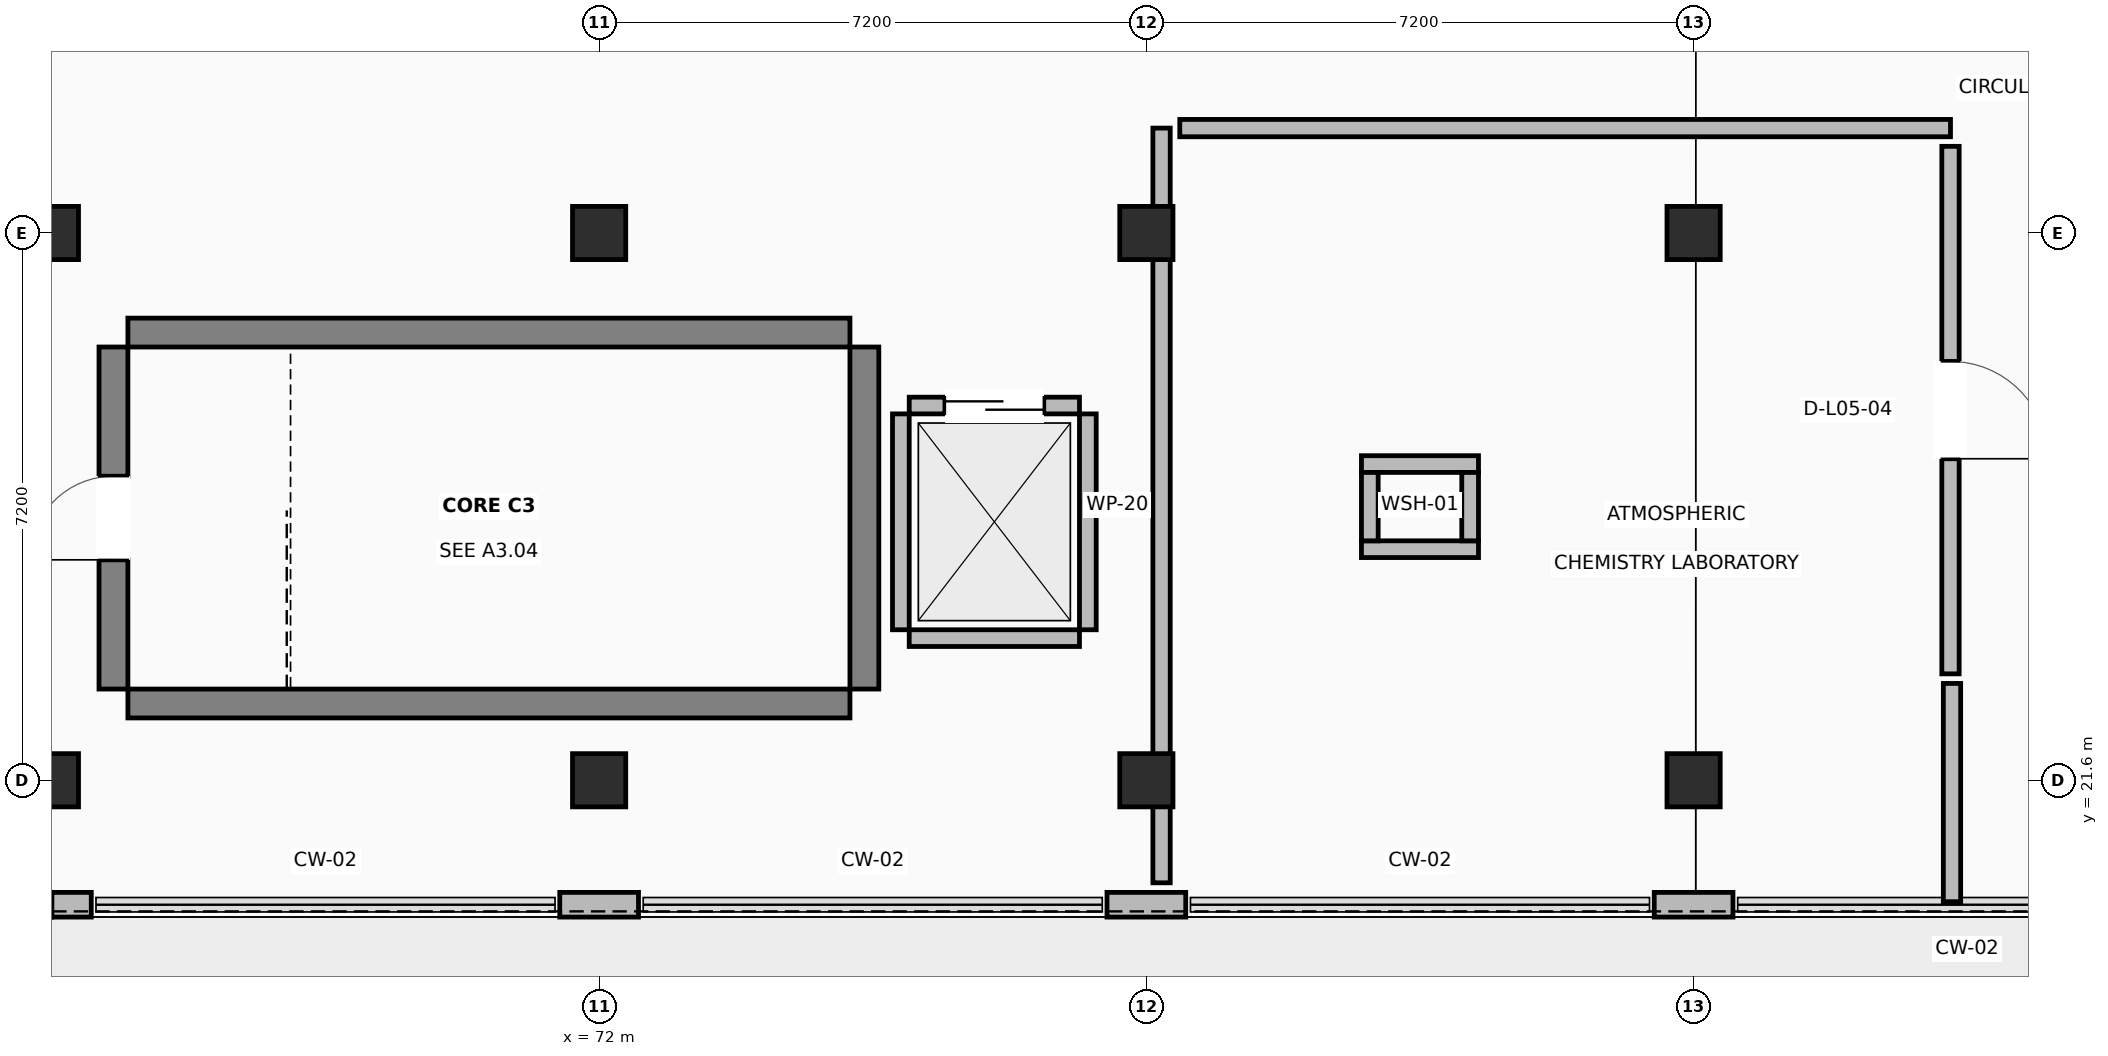
"""IFC4 building model, lengths in metres.
Left out: names, types, materials, properties, quantities, classifications, styles, units other than length and angle.
Written with IfcOpenShell. Run it as: python <this file> out.ifc"""

import sys

from ifc_helpers import new_model, si_unit, direction, frame, frame_2d, origin, origin_2d, place, context, subcontext, project, spatial, rectangle, extrude, element, fill, save


model = new_model("IFC4")
c1 = context("Model", 3, precision=1e-05, world=origin(), true_north=direction((0.0, 1.0)))
c2 = subcontext(c1, "Body", "Model", "MODEL_VIEW")
j1 = project(units=[si_unit("LENGTHUNIT", "METRE"), si_unit("PLANEANGLEUNIT", "RADIAN")], contexts=[c1])
p1 = place(None, origin())
s1 = spatial("IfcSite", under=j1, at=p1, CompositionType="ELEMENT")
p2 = place(p1, origin())
s2 = spatial("IfcBuilding", under=s1, at=p2, CompositionType="ELEMENT")
p3 = place(p2, frame((0.0, 0.0, 22.5)))
s3 = spatial("IfcBuildingStorey", under=s2, at=p3, CompositionType="ELEMENT", Elevation=22.5)
for number, where, z_axis, x_axis in (
    (1, (64.8, 21.6, 0.0), (0.0, 0.0, 1.0), (1.0, 0.0, 0.0)),
    (2, (64.8, 28.8, 0.0), (0.0, 0.0, 1.0), (1.0, 0.0, 0.0)),
    (3, (72.0, 21.6, 0.0), (0.0, 0.0, 1.0), (1.0, 0.0, 0.0)),
    (4, (72.0, 28.8, 0.0), (0.0, 0.0, 1.0), (1.0, 0.0, 0.0)),
    (5, (79.2, 21.6, 0.0), (0.0, 0.0, 1.0), (1.0, 0.0, 0.0)),
    (6, (79.2, 28.8, 0.0), (0.0, 0.0, 1.0), (1.0, 0.0, 0.0)),
    (7, (86.4, 21.6, 0.0), (0.0, 0.0, 1.0), (1.0, 0.0, 0.0)),
    (8, (86.4, 28.8, 0.0), (0.0, 0.0, 1.0), (1.0, 0.0, 0.0)),
):
    element("IfcColumn", number, at=place(p3, frame(where, z_axis=z_axis, x_axis=x_axis)), inside=s3, PredefinedType="COLUMN", context=c2, shape_type="SweptSolid", body=[
        extrude(rectangle(XDim=0.7, YDim=0.7, at=origin_2d()), origin(), (0.0, 0.0, 1.0), 4.5),
    ])
for number, where, z_axis, x_axis in (
    (9, (65.8, 22.61, 0.0), (0.0, 0.0, 1.0), (1.0, 0.0, 0.0)),
    (10, (65.8, 27.49, 0.0), (0.0, 0.0, 1.0), (1.0, 0.0, 0.0)),
):
    element("IfcWall", number, at=place(p3, frame(where, z_axis=z_axis, x_axis=x_axis)), inside=s3, PredefinedType="SHEAR", context=c2, shape_type="SweptSolid", body=[
        extrude(rectangle(XDim=9.5, YDim=0.38, at=frame_2d((4.75, 0.0))), origin(), (0.0, 0.0, 1.0), 4.22),
    ])
p4 = place(p3, frame((65.61, 22.8, 0.0), z_axis=(0.0, 0.0, 1.0), x_axis=(0.0, 1.0, 0.0)))
e11 = element("IfcWall", 11, at=p4, inside=s3, PredefinedType="SHEAR", context=c2, shape_type="SweptSolid", body=[
    extrude(rectangle(XDim=4.5, YDim=0.38, at=frame_2d((2.25, 0.0))), origin(), (0.0, 0.0, 1.0), 4.22),
])
p5 = place(p4, frame((1.7, 0.0, 0.0)))
e12 = element("IfcOpeningElement", 12, at=p5, cuts=e11, PredefinedType="OPENING", context=c2, shape_type="SweptSolid", body=[
    extrude(rectangle(XDim=1.1, YDim=2.15, at=frame_2d((0.55, 1.075))), frame((0.0, 0.2, 0.0), z_axis=(0.0, -1.0, 0.0), x_axis=(1.0, 0.0, 0.0)), (0.0, 0.0, 1.0), 0.4),
])
p6 = place(p3, frame((75.49, 22.8, 0.0), z_axis=(0.0, 0.0, 1.0), x_axis=(0.0, 1.0, 0.0)))
e13 = element("IfcWall", 13, at=p6, inside=s3, PredefinedType="SHEAR", context=c2, shape_type="SweptSolid", body=[
    extrude(rectangle(XDim=4.5, YDim=0.38, at=frame_2d((2.25, 0.0))), origin(), (0.0, 0.0, 1.0), 4.22),
])
p7 = place(p3, frame((64.8, 19.962, 0.0), z_axis=(0.0, 0.0, 1.0), x_axis=(1.0, 0.0, 0.0)))
e14 = element("IfcWall", 14, at=p7, inside=s3, PredefinedType="STANDARD", context=c2, shape_type="SweptSolid", body=[
    extrude(rectangle(XDim=0.518, YDim=0.325, at=frame_2d((0.259, 0.0))), origin(), (0.0, 0.0, 1.0), 3.26),
])
for number, where, z_axis, x_axis in (
    (15, (71.482, 19.962, 0.0), (0.0, 0.0, 1.0), (1.0, 0.0, 0.0)),
    (16, (78.682, 19.962, 0.0), (0.0, 0.0, 1.0), (1.0, 0.0, 0.0)),
):
    element("IfcWall", number, at=place(p3, frame(where, z_axis=z_axis, x_axis=x_axis)), inside=s3, PredefinedType="STANDARD", context=c2, shape_type="SweptSolid", body=[
        extrude(rectangle(XDim=1.036, YDim=0.325, at=frame_2d((0.518, 0.0))), origin(), (0.0, 0.0, 1.0), 3.26),
    ])
p8 = place(p3, frame((85.882, 19.962, 0.0), z_axis=(0.0, 0.0, 1.0), x_axis=(1.0, 0.0, 0.0)))
e17 = element("IfcWall", 17, at=p8, inside=s3, PredefinedType="STANDARD", context=c2, shape_type="SweptSolid", body=[
    extrude(rectangle(XDim=1.036, YDim=0.325, at=frame_2d((0.518, 0.0))), origin(), (0.0, 0.0, 1.0), 3.26),
])
p9 = place(p3, frame((76.08, 23.47, 0.0), z_axis=(0.0, 0.0, 1.0), x_axis=(1.0, 0.0, 0.0)))
e18 = element("IfcWall", 18, at=p9, inside=s3, PredefinedType="STANDARD", context=c2, shape_type="SweptSolid", body=[
    extrude(rectangle(XDim=2.24, YDim=0.22, at=frame_2d((1.12, 0.0))), origin(), (0.0, 0.0, 1.0), 3.26),
])
p10 = place(p3, frame((76.08, 26.53, 0.0), z_axis=(0.0, 0.0, 1.0), x_axis=(1.0, 0.0, 0.0)))
e19 = element("IfcWall", 19, at=p10, inside=s3, PredefinedType="STANDARD", context=c2, shape_type="SweptSolid", body=[
    extrude(rectangle(XDim=2.24, YDim=0.22, at=frame_2d((1.12, 0.0))), origin(), (0.0, 0.0, 1.0), 3.26),
])
p11 = place(p10, frame((0.47, 0.0, 0.0)))
e20 = element("IfcOpeningElement", 20, at=p11, cuts=e19, PredefinedType="OPENING", context=c2, shape_type="SweptSolid", body=[
    extrude(rectangle(XDim=1.3, YDim=2.2, at=frame_2d((0.65, 1.1))), frame((0.0, 0.12, 0.0), z_axis=(0.0, -1.0, 0.0), x_axis=(1.0, 0.0, 0.0)), (0.0, 0.0, 1.0), 0.24),
])
for number, where, z_axis, x_axis in (
    (21, (75.97, 23.58, 0.0), (0.0, 0.0, 1.0), (0.0, 1.0, 0.0)),
    (22, (78.43, 23.58, 0.0), (0.0, 0.0, 1.0), (0.0, 1.0, 0.0)),
):
    element("IfcWall", number, at=place(p3, frame(where, z_axis=z_axis, x_axis=x_axis)), inside=s3, PredefinedType="STANDARD", context=c2, shape_type="SweptSolid", body=[
        extrude(rectangle(XDim=2.84, YDim=0.22, at=frame_2d((1.42, 0.0))), origin(), (0.0, 0.0, 1.0), 3.26),
    ])
for number, where, z_axis, x_axis in (
    (23, (82.03, 24.64, 0.0), (0.0, 0.0, 1.0), (1.0, 0.0, 0.0)),
    (24, (82.03, 25.76, 0.0), (0.0, 0.0, 1.0), (1.0, 0.0, 0.0)),
):
    element("IfcWall", number, at=place(p3, frame(where, z_axis=z_axis, x_axis=x_axis)), inside=s3, PredefinedType="STANDARD", context=c2, shape_type="SweptSolid", body=[
        extrude(rectangle(XDim=1.54, YDim=0.22, at=frame_2d((0.77, 0.0))), origin(), (0.0, 0.0, 1.0), 3.26),
    ])
for number, where, z_axis, x_axis in (
    (25, (82.14, 24.75, 0.0), (0.0, 0.0, 1.0), (0.0, 1.0, 0.0)),
    (26, (83.46, 24.75, 0.0), (0.0, 0.0, 1.0), (0.0, 1.0, 0.0)),
):
    element("IfcWall", number, at=place(p3, frame(where, z_axis=z_axis, x_axis=x_axis)), inside=s3, PredefinedType="STANDARD", context=c2, shape_type="SweptSolid", body=[
        extrude(rectangle(XDim=0.9, YDim=0.22, at=frame_2d((0.45, 0.0))), origin(), (0.0, 0.0, 1.0), 3.26),
    ])
p12 = place(p3, frame((79.4, 20.251, 0.0), z_axis=(0.0, 0.0, 1.0), x_axis=(0.0, 1.0, 0.0)))
e27 = element("IfcWall", 27, at=p12, inside=s3, PredefinedType="PARTITIONING", context=c2, shape_type="SweptSolid", body=[
    extrude(rectangle(XDim=9.929, YDim=0.228, at=frame_2d((4.964, 0.0))), origin(), (0.0, 0.0, 1.0), 3.26),
])
p13 = place(p3, frame((79.64, 30.18, 0.0), z_axis=(0.0, 0.0, 1.0), x_axis=(1.0, 0.0, 0.0)))
e28 = element("IfcWall", 28, at=p13, inside=s3, PredefinedType="PARTITIONING", context=c2, shape_type="SweptSolid", body=[
    extrude(rectangle(XDim=10.14, YDim=0.228, at=frame_2d((5.07, 0.0))), origin(), (0.0, 0.0, 1.0), 3.26),
])
p14 = place(p3, frame((89.78, 29.94, 0.0), z_axis=(0.0, 0.0, 1.0), x_axis=(0.0, -1.0, 0.0)))
e29 = element("IfcWall", 29, at=p14, inside=s3, PredefinedType="PARTITIONING", context=c2, shape_type="SweptSolid", body=[
    extrude(rectangle(XDim=6.94, YDim=0.228, at=frame_2d((3.47, 0.0))), origin(), (0.0, 0.0, 1.0), 3.26),
])
p15 = place(p14, frame((2.83, 0.0, 0.0)))
e30 = element("IfcOpeningElement", 30, at=p15, cuts=e29, PredefinedType="OPENING", context=c2, shape_type="SweptSolid", body=[
    extrude(rectangle(XDim=1.28, YDim=2.15, at=frame_2d((0.64, 1.075))), frame((0.0, 0.124, 0.0), z_axis=(0.0, -1.0, 0.0), x_axis=(1.0, 0.0, 0.0)), (0.0, 0.0, 1.0), 0.248),
])
p16 = place(p3, frame((89.8, 22.874, 0.0), z_axis=(0.0, 0.0, 1.0), x_axis=(0.0, -1.0, 0.0)))
e31 = element("IfcWall", 31, at=p16, inside=s3, PredefinedType="PARTITIONING", context=c2, shape_type="SweptSolid", body=[
    extrude(rectangle(XDim=2.872, YDim=0.228, at=frame_2d((1.436, 0.0))), origin(), (0.0, 0.0, 1.0), 3.26),
])
p17 = place(p5, origin())
e32 = element("IfcDoor", 32, at=p17, inside=s3, OperationType="SINGLE_SWING_LEFT", PredefinedType="DOOR", context=c2, shape_type="SweptSolid", body=[
    extrude(rectangle(XDim=1.1, YDim=2.15, at=frame_2d((0.55, 1.075))), frame((0.0, 0.025, 0.0), z_axis=(0.0, -1.0, 0.0), x_axis=(1.0, 0.0, 0.0)), (0.0, 0.0, 1.0), 0.05),
])
fill(e12, e32)
p18 = place(p11, origin())
e33 = element("IfcDoor", 33, at=p18, inside=s3, OperationType="SLIDING_TO_LEFT", PredefinedType="DOOR", context=c2, shape_type="SweptSolid", body=[
    extrude(rectangle(XDim=1.3, YDim=2.2, at=frame_2d((0.65, 1.1))), frame((0.0, 0.025, 0.0), z_axis=(0.0, -1.0, 0.0), x_axis=(1.0, 0.0, 0.0)), (0.0, 0.0, 1.0), 0.05),
])
fill(e20, e33)
p19 = place(p15, origin())
e34 = element("IfcDoor", 34, at=p19, inside=s3, OperationType="SINGLE_SWING_RIGHT", PredefinedType="DOOR", context=c2, shape_type="SweptSolid", body=[
    extrude(rectangle(XDim=1.28, YDim=2.15, at=frame_2d((0.64, 1.075))), frame((0.0, 0.025, 0.0), z_axis=(0.0, -1.0, 0.0), x_axis=(1.0, 0.0, 0.0)), (0.0, 0.0, 1.0), 0.05),
])
fill(e30, e34)
save(model, sys.argv[1])
